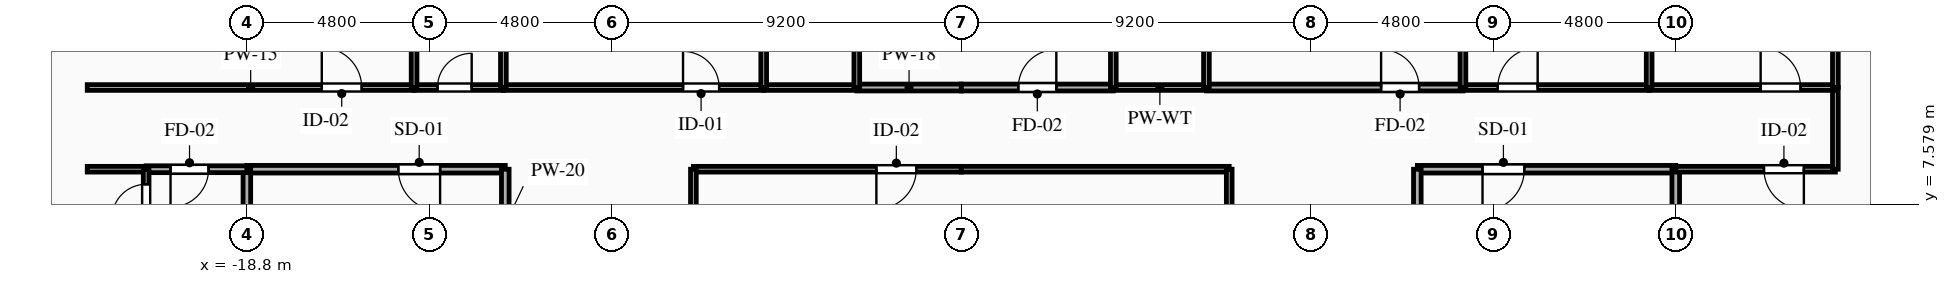
"""IFC4 building model, lengths in metres.
Left out: names, types, materials, properties, quantities, classifications, styles, units other than length and angle.
Written with IfcOpenShell. Run it as: python <this file> out.ifc"""

import sys

from ifc_helpers import new_model, si_unit, direction, frame, frame_2d, origin, place, context, subcontext, project, spatial, rectangle, extrude, element, fill, save


model = new_model("IFC4")
c1 = context("Model", 3, precision=1e-05, world=origin(), true_north=direction((0.0, 1.0)))
c2 = subcontext(c1, "Body", "Model", "MODEL_VIEW")
j1 = project(units=[si_unit("LENGTHUNIT", "METRE"), si_unit("PLANEANGLEUNIT", "RADIAN")], contexts=[c1])
p1 = place(None, origin())
s1 = spatial("IfcSite", under=j1, at=p1, CompositionType="ELEMENT")
p2 = place(p1, origin())
s2 = spatial("IfcBuilding", under=s1, at=p2, CompositionType="ELEMENT")
p3 = place(p2, frame((0.0, 0.0, 37.05)))
s3 = spatial("IfcBuildingStorey", under=s2, at=p3, CompositionType="ELEMENT", Elevation=37.05)
p4 = place(p3, frame((-12.0, 8.5, 0.0), z_axis=(0.0, 0.0, 1.0), x_axis=(-1.0, 0.0, 0.0)))
e1 = element("IfcWall", 1, at=p4, inside=s3, PredefinedType="PARTITIONING", context=c2, shape_type="SweptSolid", body=[
    extrude(rectangle(XDim=6.8, YDim=0.2, at=frame_2d((3.4, 0.0))), origin(), (0.0, 0.0, 1.0), 3.035),
])
p5 = place(p4, frame((1.715, 0.0, 0.0)))
e2 = element("IfcOpeningElement", 2, at=p5, cuts=e1, PredefinedType="OPENING", context=c2, shape_type="SweptSolid", body=[
    extrude(rectangle(XDim=1.1, YDim=2.15, at=frame_2d((0.55, 1.075))), frame((0.0, 0.11, 0.0), z_axis=(0.0, -1.0, 0.0), x_axis=(1.0, 0.0, 0.0)), (0.0, 0.0, 1.0), 0.22),
])
p6 = place(p3, frame((-12.0, 5.6, 0.0), z_axis=(0.0, 0.0, 1.0), x_axis=(0.0, 1.0, 0.0)))
e3 = element("IfcWall", 3, at=p6, inside=s3, PredefinedType="PARTITIONING", context=c2, shape_type="SweptSolid", body=[
    extrude(rectangle(XDim=2.9, YDim=0.2, at=frame_2d((1.45, 0.0))), origin(), (0.0, 0.0, 1.0), 3.035),
])
p7 = place(p3, frame((-18.8, 8.5, 0.0), z_axis=(0.0, 0.0, 1.0), x_axis=(0.0, -1.0, 0.0)))
e4 = element("IfcWall", 4, at=p7, inside=s3, PredefinedType="PARTITIONING", context=c2, shape_type="SweptSolid", body=[
    extrude(rectangle(XDim=2.9, YDim=0.2, at=frame_2d((1.45, 0.0))), origin(), (0.0, 0.0, 1.0), 2.52),
])
p8 = place(p3, frame((18.8, 8.5, 0.0), z_axis=(0.0, 0.0, 1.0), x_axis=(-1.0, 0.0, 0.0)))
e5 = element("IfcWall", 5, at=p8, inside=s3, PredefinedType="PARTITIONING", context=c2, shape_type="SweptSolid", body=[
    extrude(rectangle(XDim=6.8, YDim=0.2, at=frame_2d((3.4, 0.0))), origin(), (0.0, 0.0, 1.0), 3.035),
])
p9 = place(p8, frame((3.985, 0.0, 0.0)))
e6 = element("IfcOpeningElement", 6, at=p9, cuts=e5, PredefinedType="OPENING", context=c2, shape_type="SweptSolid", body=[
    extrude(rectangle(XDim=1.1, YDim=2.15, at=frame_2d((0.55, 1.075))), frame((0.0, 0.11, 0.0), z_axis=(0.0, -1.0, 0.0), x_axis=(1.0, 0.0, 0.0)), (0.0, 0.0, 1.0), 0.22),
])
p10 = place(p3, frame((12.0, 8.5, 0.0), z_axis=(0.0, 0.0, 1.0), x_axis=(0.0, -1.0, 0.0)))
e7 = element("IfcWall", 7, at=p10, inside=s3, PredefinedType="PARTITIONING", context=c2, shape_type="SweptSolid", body=[
    extrude(rectangle(XDim=2.9, YDim=0.2, at=frame_2d((1.45, 0.0))), origin(), (0.0, 0.0, 1.0), 3.035),
])
p11 = place(p3, frame((18.8, 6.327, 0.0), z_axis=(0.0, 0.0, 1.0), x_axis=(0.0, 1.0, 0.0)))
e8 = element("IfcWall", 8, at=p11, inside=s3, PredefinedType="PARTITIONING", context=c2, shape_type="SweptSolid", body=[
    extrude(rectangle(XDim=2.173, YDim=0.2, at=frame_2d((1.086, 0.0))), origin(), (0.0, 0.0, 1.0), 2.52),
])
p12 = place(p3, frame((-18.8, 8.5, 0.0), z_axis=(0.0, 0.0, 1.0), x_axis=(-1.0, 0.0, 0.0)))
e9 = element("IfcWall", 9, at=p12, inside=s3, PredefinedType="PARTITIONING", context=c2, shape_type="SweptSolid", body=[
    extrude(rectangle(XDim=2.65, YDim=0.18, at=frame_2d((1.325, 0.0))), origin(), (0.0, 0.0, 1.0), 3.035),
])
p13 = place(p12, frame((1.009, 0.0, 0.0)))
e10 = element("IfcOpeningElement", 10, at=p13, cuts=e9, PredefinedType="OPENING", context=c2, shape_type="SweptSolid", body=[
    extrude(rectangle(XDim=1.0, YDim=2.15, at=frame_2d((0.5, 1.075))), frame((0.0, 0.1, 0.0), z_axis=(0.0, -1.0, 0.0), x_axis=(1.0, 0.0, 0.0)), (0.0, 0.0, 1.0), 0.2),
])
p14 = place(p3, frame((-21.45, 8.5, 0.0), z_axis=(0.0, 0.0, 1.0), x_axis=(-1.0, 0.0, 0.0)))
e11 = element("IfcWall", 11, at=p14, inside=s3, PredefinedType="PARTITIONING", context=c2, shape_type="SweptSolid", body=[
    extrude(rectangle(XDim=1.55, YDim=0.15, at=frame_2d((0.775, 0.0))), origin(), (0.0, 0.0, 1.0), 3.035),
])
p15 = place(p3, frame((-23.0, 10.65, 0.0), z_axis=(0.0, 0.0, 1.0), x_axis=(1.0, 0.0, 0.0)))
e12 = element("IfcWall", 12, at=p15, inside=s3, PredefinedType="PARTITIONING", context=c2, shape_type="SweptSolid", body=[
    extrude(rectangle(XDim=8.6, YDim=0.15, at=frame_2d((4.3, 0.0))), origin(), (0.0, 0.0, 1.0), 3.035),
])
p16 = place(p15, frame((6.171, 0.0, 0.0)))
e13 = element("IfcOpeningElement", 13, at=p16, cuts=e12, PredefinedType="OPENING", context=c2, shape_type="SweptSolid", body=[
    extrude(rectangle(XDim=1.05, YDim=2.15, at=frame_2d((0.525, 1.075))), frame((0.0, 0.085, 0.0), z_axis=(0.0, -1.0, 0.0), x_axis=(1.0, 0.0, 0.0)), (0.0, 0.0, 1.0), 0.17),
])
p17 = place(p3, frame((-14.4, 10.65, 0.0), z_axis=(0.0, 0.0, 1.0), x_axis=(1.0, 0.0, 0.0)))
e14 = element("IfcWall", 14, at=p17, inside=s3, PredefinedType="PLUMBINGWALL", context=c2, shape_type="SweptSolid", body=[
    extrude(rectangle(XDim=2.35, YDim=0.15, at=frame_2d((1.175, 0.0))), origin(), (0.0, 0.0, 1.0), 3.035),
])
p18 = place(p17, frame((0.616, 0.0, 0.0)))
e15 = element("IfcOpeningElement", 15, at=p18, cuts=e14, PredefinedType="OPENING", context=c2, shape_type="SweptSolid", body=[
    extrude(rectangle(XDim=0.9, YDim=2.1, at=frame_2d((0.45, 1.05))), frame((0.0, 0.085, 0.0), z_axis=(0.0, -1.0, 0.0), x_axis=(1.0, 0.0, 0.0)), (0.0, 0.0, 1.0), 0.17),
])
p19 = place(p3, frame((-12.05, 10.65, 0.0), z_axis=(0.0, 0.0, 1.0), x_axis=(1.0, 0.0, 0.0)))
e16 = element("IfcWall", 16, at=p19, inside=s3, PredefinedType="PARTITIONING", context=c2, shape_type="SweptSolid", body=[
    extrude(rectangle(XDim=6.85, YDim=0.15, at=frame_2d((3.425, 0.0))), origin(), (0.0, 0.0, 1.0), 3.035),
])
p20 = place(p19, frame((4.728, 0.0, 0.0)))
e17 = element("IfcOpeningElement", 17, at=p20, cuts=e16, PredefinedType="OPENING", context=c2, shape_type="SweptSolid", body=[
    extrude(rectangle(XDim=0.95, YDim=2.1, at=frame_2d((0.475, 1.05))), frame((0.0, 0.085, 0.0), z_axis=(0.0, -1.0, 0.0), x_axis=(1.0, 0.0, 0.0)), (0.0, 0.0, 1.0), 0.17),
])
p21 = place(p3, frame((-2.75, 10.65, 0.0), z_axis=(0.0, 0.0, 1.0), x_axis=(1.0, 0.0, 0.0)))
e18 = element("IfcWall", 18, at=p21, inside=s3, PredefinedType="PARTITIONING", context=c2, shape_type="SweptSolid", body=[
    extrude(rectangle(XDim=2.75, YDim=0.18, at=frame_2d((1.375, 0.0))), origin(), (0.0, 0.0, 1.0), 3.035),
])
p22 = place(p3, frame((-5.2, 10.65, 0.0), z_axis=(0.0, 0.0, 1.0), x_axis=(1.0, 0.0, 0.0)))
e19 = element("IfcWall", 19, at=p22, inside=s3, PredefinedType="PLUMBINGWALL", context=c2, shape_type="SweptSolid", body=[
    extrude(rectangle(XDim=2.45, YDim=0.15, at=frame_2d((1.225, 0.0))), origin(), (0.0, 0.0, 1.0), 3.035),
])
p23 = place(p3, frame((0.0, 8.5, 0.0), z_axis=(0.0, 0.0, 1.0), x_axis=(-1.0, 0.0, 0.0)))
e20 = element("IfcWall", 20, at=p23, inside=s3, PredefinedType="PARTITIONING", context=c2, shape_type="SweptSolid", body=[
    extrude(rectangle(XDim=7.05, YDim=0.15, at=frame_2d((3.525, 0.0))), origin(), (0.0, 0.0, 1.0), 3.035),
])
p24 = place(p23, frame((1.185, 0.0, 0.0)))
e21 = element("IfcOpeningElement", 21, at=p24, cuts=e20, PredefinedType="OPENING", context=c2, shape_type="SweptSolid", body=[
    extrude(rectangle(XDim=1.05, YDim=2.15, at=frame_2d((0.525, 1.075))), frame((0.0, 0.085, 0.0), z_axis=(0.0, -1.0, 0.0), x_axis=(1.0, 0.0, 0.0)), (0.0, 0.0, 1.0), 0.17),
])
p25 = place(p3, frame((23.0, 8.5, 0.0), z_axis=(0.0, 0.0, 1.0), x_axis=(-1.0, 0.0, 0.0)))
e22 = element("IfcWall", 22, at=p25, inside=s3, PredefinedType="PARTITIONING", context=c2, shape_type="SweptSolid", body=[
    extrude(rectangle(XDim=4.2, YDim=0.15, at=frame_2d((2.1, 0.0))), origin(), (0.0, 0.0, 1.0), 3.035),
])
p26 = place(p25, frame((0.829, 0.0, 0.0)))
e23 = element("IfcOpeningElement", 23, at=p26, cuts=e22, PredefinedType="OPENING", context=c2, shape_type="SweptSolid", body=[
    extrude(rectangle(XDim=1.05, YDim=2.15, at=frame_2d((0.525, 1.075))), frame((0.0, 0.085, 0.0), z_axis=(0.0, -1.0, 0.0), x_axis=(1.0, 0.0, 0.0)), (0.0, 0.0, 1.0), 0.17),
])
p27 = place(p3, frame((23.0, 10.65, 0.0), z_axis=(0.0, 0.0, 1.0), x_axis=(0.0, -1.0, 0.0)))
e24 = element("IfcWall", 24, at=p27, inside=s3, PredefinedType="PARTITIONING", context=c2, shape_type="SweptSolid", body=[
    extrude(rectangle(XDim=2.15, YDim=0.15, at=frame_2d((1.075, 0.0))), origin(), (0.0, 0.0, 1.0), 3.035),
])
p28 = place(p3, frame((0.0, 10.65, 0.0), z_axis=(0.0, 0.0, 1.0), x_axis=(1.0, 0.0, 0.0)))
e25 = element("IfcWall", 25, at=p28, inside=s3, PredefinedType="PARTITIONING", context=c2, shape_type="SweptSolid", body=[
    extrude(rectangle(XDim=4.0, YDim=0.18, at=frame_2d((2.0, 0.0))), origin(), (0.0, 0.0, 1.0), 3.035),
])
p29 = place(p28, frame((1.5, 0.0, 0.0)))
e26 = element("IfcOpeningElement", 26, at=p29, cuts=e25, PredefinedType="OPENING", context=c2, shape_type="SweptSolid", body=[
    extrude(rectangle(XDim=1.0, YDim=2.15, at=frame_2d((0.5, 1.075))), frame((0.0, 0.1, 0.0), z_axis=(0.0, -1.0, 0.0), x_axis=(1.0, 0.0, 0.0)), (0.0, 0.0, 1.0), 0.2),
])
p30 = place(p3, frame((6.45, 10.65, 0.0), z_axis=(0.0, 0.0, 1.0), x_axis=(1.0, 0.0, 0.0)))
e27 = element("IfcWall", 27, at=p30, inside=s3, PredefinedType="PARTITIONING", context=c2, shape_type="SweptSolid", body=[
    extrude(rectangle(XDim=6.75, YDim=0.18, at=frame_2d((3.375, 0.0))), origin(), (0.0, 0.0, 1.0), 3.035),
])
p31 = place(p30, frame((4.596, 0.0, 0.0)))
e28 = element("IfcOpeningElement", 28, at=p31, cuts=e27, PredefinedType="OPENING", context=c2, shape_type="SweptSolid", body=[
    extrude(rectangle(XDim=1.0, YDim=2.15, at=frame_2d((0.5, 1.075))), frame((0.0, 0.1, 0.0), z_axis=(0.0, -1.0, 0.0), x_axis=(1.0, 0.0, 0.0)), (0.0, 0.0, 1.0), 0.2),
])
p32 = place(p3, frame((4.0, 10.65, 0.0), z_axis=(0.0, 0.0, 1.0), x_axis=(1.0, 0.0, 0.0)))
e29 = element("IfcWall", 29, at=p32, inside=s3, PredefinedType="PLUMBINGWALL", context=c2, shape_type="SweptSolid", body=[
    extrude(rectangle(XDim=2.45, YDim=0.15, at=frame_2d((1.225, 0.0))), origin(), (0.0, 0.0, 1.0), 3.035),
])
p33 = place(p3, frame((13.2, 10.65, 0.0), z_axis=(0.0, 0.0, 1.0), x_axis=(1.0, 0.0, 0.0)))
e30 = element("IfcWall", 30, at=p33, inside=s3, PredefinedType="PARTITIONING", context=c2, shape_type="SweptSolid", body=[
    extrude(rectangle(XDim=4.9, YDim=0.15, at=frame_2d((2.45, 0.0))), origin(), (0.0, 0.0, 1.0), 3.035),
])
p34 = place(p33, frame((0.916, 0.0, 0.0)))
e31 = element("IfcOpeningElement", 31, at=p34, cuts=e30, PredefinedType="OPENING", context=c2, shape_type="SweptSolid", body=[
    extrude(rectangle(XDim=1.05, YDim=2.15, at=frame_2d((0.525, 1.075))), frame((0.0, 0.085, 0.0), z_axis=(0.0, -1.0, 0.0), x_axis=(1.0, 0.0, 0.0)), (0.0, 0.0, 1.0), 0.17),
])
p35 = place(p3, frame((18.1, 10.65, 0.0), z_axis=(0.0, 0.0, 1.0), x_axis=(1.0, 0.0, 0.0)))
e32 = element("IfcWall", 32, at=p35, inside=s3, PredefinedType="PARTITIONING", context=c2, shape_type="SweptSolid", body=[
    extrude(rectangle(XDim=4.9, YDim=0.15, at=frame_2d((2.45, 0.0))), origin(), (0.0, 0.0, 1.0), 3.035),
])
p36 = place(p35, frame((2.934, 0.0, 0.0)))
e33 = element("IfcOpeningElement", 33, at=p36, cuts=e32, PredefinedType="OPENING", context=c2, shape_type="SweptSolid", body=[
    extrude(rectangle(XDim=1.05, YDim=2.15, at=frame_2d((0.525, 1.075))), frame((0.0, 0.085, 0.0), z_axis=(0.0, -1.0, 0.0), x_axis=(1.0, 0.0, 0.0)), (0.0, 0.0, 1.0), 0.17),
])
for number, where, z_axis, x_axis in (
    (34, (7.05, 8.5, 0.0), (0.0, 0.0, 1.0), (-1.0, 0.0, 0.0)),
    (35, (-7.05, 8.5, 0.0), (0.0, 0.0, 1.0), (0.0, -1.0, 0.0)),
    (36, (7.05, 1.45, 0.0), (0.0, 0.0, 1.0), (0.0, 1.0, 0.0)),
):
    element("IfcWall", number, at=place(p3, frame(where, z_axis=z_axis, x_axis=x_axis)), inside=s3, PredefinedType="PARTITIONING", context=c2, shape_type="SweptSolid", body=[
        extrude(rectangle(XDim=7.05, YDim=0.15, at=frame_2d((3.525, 0.0))), origin(), (0.0, 0.0, 1.0), 3.035),
    ])
p37 = place(p3, frame((-21.45, 6.808, 0.0), z_axis=(0.0, 0.0, 1.0), x_axis=(0.0, 1.0, 0.0)))
e37 = element("IfcWall", 37, at=p37, inside=s3, PredefinedType="PARTITIONING", context=c2, shape_type="SweptSolid", body=[
    extrude(rectangle(XDim=1.692, YDim=0.15, at=frame_2d((0.846, 0.0))), origin(), (0.0, 0.0, 1.0), 3.035),
])
p38 = place(p37, frame((0.396, 0.0, 0.0)))
e38 = element("IfcOpeningElement", 38, at=p38, cuts=e37, PredefinedType="OPENING", context=c2, shape_type="SweptSolid", body=[
    extrude(rectangle(XDim=0.9, YDim=2.1, at=frame_2d((0.45, 1.05))), frame((0.0, 0.085, 0.0), z_axis=(0.0, -1.0, 0.0), x_axis=(1.0, 0.0, 0.0)), (0.0, 0.0, 1.0), 0.17),
])
p39 = place(p3, frame((23.0, 10.65, 0.0), z_axis=(0.0, 0.0, 1.0), x_axis=(0.0, 1.0, 0.0)))
e39 = element("IfcWall", 39, at=p39, inside=s3, PredefinedType="PARTITIONING", context=c2, shape_type="SweptSolid", body=[
    extrude(rectangle(XDim=8.75, YDim=0.15, at=frame_2d((4.375, 0.0))), origin(), (0.0, 0.0, 1.0), 3.035),
])
for number, where, z_axis, x_axis in (
    (40, (-14.4, 19.4, 0.0), (0.0, 0.0, 1.0), (0.0, -1.0, 0.0)),
    (41, (-12.05, 19.4, 0.0), (0.0, 0.0, 1.0), (0.0, -1.0, 0.0)),
):
    element("IfcWall", number, at=place(p3, frame(where, z_axis=z_axis, x_axis=x_axis)), inside=s3, PredefinedType="PLUMBINGWALL", context=c2, shape_type="SweptSolid", body=[
        extrude(rectangle(XDim=8.75, YDim=0.15, at=frame_2d((4.375, 0.0))), origin(), (0.0, 0.0, 1.0), 3.035),
    ])
for number, where, z_axis, x_axis in (
    (42, (-5.2, 12.8, 0.0), (0.0, 0.0, 1.0), (0.0, -1.0, 0.0)),
    (43, (-2.75, 10.65, 0.0), (0.0, 0.0, 1.0), (0.0, 1.0, 0.0)),
    (44, (4.0, 12.8, 0.0), (0.0, 0.0, 1.0), (0.0, -1.0, 0.0)),
    (45, (6.45, 10.65, 0.0), (0.0, 0.0, 1.0), (0.0, 1.0, 0.0)),
):
    element("IfcWall", number, at=place(p3, frame(where, z_axis=z_axis, x_axis=x_axis)), inside=s3, PredefinedType="PLUMBINGWALL", context=c2, shape_type="SweptSolid", body=[
        extrude(rectangle(XDim=2.15, YDim=0.15, at=frame_2d((1.075, 0.0))), origin(), (0.0, 0.0, 1.0), 3.035),
    ])
for number, where, z_axis, x_axis in (
    (46, (13.2, 19.4, 0.0), (0.0, 0.0, 1.0), (0.0, -1.0, 0.0)),
    (47, (18.1, 19.4, 0.0), (0.0, 0.0, 1.0), (0.0, -1.0, 0.0)),
):
    element("IfcWall", number, at=place(p3, frame(where, z_axis=z_axis, x_axis=x_axis)), inside=s3, PredefinedType="PARTITIONING", context=c2, shape_type="SweptSolid", body=[
        extrude(rectangle(XDim=8.75, YDim=0.15, at=frame_2d((4.375, 0.0))), origin(), (0.0, 0.0, 1.0), 3.035),
    ])
p40 = place(p5, origin())
e48 = element("IfcDoor", 48, at=p40, inside=s3, OperationType="SINGLE_SWING_LEFT", PredefinedType="DOOR", context=c2, shape_type="SweptSolid", body=[
    extrude(rectangle(XDim=1.1, YDim=2.15, at=frame_2d((0.55, 1.075))), frame((0.0, 0.025, 0.0), z_axis=(0.0, -1.0, 0.0), x_axis=(1.0, 0.0, 0.0)), (0.0, 0.0, 1.0), 0.05),
])
fill(e2, e48)
p41 = place(p9, origin())
e49 = element("IfcDoor", 49, at=p41, inside=s3, OperationType="SINGLE_SWING_RIGHT", PredefinedType="DOOR", context=c2, shape_type="SweptSolid", body=[
    extrude(rectangle(XDim=1.1, YDim=2.15, at=frame_2d((0.55, 1.075))), frame((0.0, 0.025, 0.0), z_axis=(0.0, -1.0, 0.0), x_axis=(1.0, 0.0, 0.0)), (0.0, 0.0, 1.0), 0.05),
])
fill(e6, e49)
p42 = place(p13, origin())
e50 = element("IfcDoor", 50, at=p42, inside=s3, OperationType="SINGLE_SWING_RIGHT", PredefinedType="DOOR", context=c2, shape_type="SweptSolid", body=[
    extrude(rectangle(XDim=1.0, YDim=2.15, at=frame_2d((0.5, 1.075))), frame((0.0, 0.025, 0.0), z_axis=(0.0, -1.0, 0.0), x_axis=(1.0, 0.0, 0.0)), (0.0, 0.0, 1.0), 0.05),
])
fill(e10, e50)
p43 = place(p16, origin())
e51 = element("IfcDoor", 51, at=p43, inside=s3, OperationType="SINGLE_SWING_LEFT", PredefinedType="DOOR", context=c2, shape_type="SweptSolid", body=[
    extrude(rectangle(XDim=1.05, YDim=2.15, at=frame_2d((0.525, 1.075))), frame((0.0, 0.025, 0.0), z_axis=(0.0, -1.0, 0.0), x_axis=(1.0, 0.0, 0.0)), (0.0, 0.0, 1.0), 0.05),
])
fill(e13, e51)
p44 = place(p18, origin())
e52 = element("IfcDoor", 52, at=p44, inside=s3, OperationType="SINGLE_SWING_RIGHT", PredefinedType="DOOR", context=c2, shape_type="SweptSolid", body=[
    extrude(rectangle(XDim=0.9, YDim=2.1, at=frame_2d((0.45, 1.05))), frame((0.0, 0.025, 0.0), z_axis=(0.0, -1.0, 0.0), x_axis=(1.0, 0.0, 0.0)), (0.0, 0.0, 1.0), 0.05),
])
fill(e15, e52)
p45 = place(p20, origin())
e53 = element("IfcDoor", 53, at=p45, inside=s3, OperationType="SINGLE_SWING_LEFT", PredefinedType="DOOR", context=c2, shape_type="SweptSolid", body=[
    extrude(rectangle(XDim=0.95, YDim=2.1, at=frame_2d((0.475, 1.05))), frame((0.0, 0.025, 0.0), z_axis=(0.0, -1.0, 0.0), x_axis=(1.0, 0.0, 0.0)), (0.0, 0.0, 1.0), 0.05),
])
fill(e17, e53)
p46 = place(p24, origin())
e54 = element("IfcDoor", 54, at=p46, inside=s3, OperationType="SINGLE_SWING_RIGHT", PredefinedType="DOOR", context=c2, shape_type="SweptSolid", body=[
    extrude(rectangle(XDim=1.05, YDim=2.15, at=frame_2d((0.525, 1.075))), frame((0.0, 0.025, 0.0), z_axis=(0.0, -1.0, 0.0), x_axis=(1.0, 0.0, 0.0)), (0.0, 0.0, 1.0), 0.05),
])
fill(e21, e54)
p47 = place(p26, origin())
e55 = element("IfcDoor", 55, at=p47, inside=s3, OperationType="SINGLE_SWING_LEFT", PredefinedType="DOOR", context=c2, shape_type="SweptSolid", body=[
    extrude(rectangle(XDim=1.05, YDim=2.15, at=frame_2d((0.525, 1.075))), frame((0.0, 0.025, 0.0), z_axis=(0.0, -1.0, 0.0), x_axis=(1.0, 0.0, 0.0)), (0.0, 0.0, 1.0), 0.05),
])
fill(e23, e55)
p48 = place(p29, origin())
e56 = element("IfcDoor", 56, at=p48, inside=s3, OperationType="SINGLE_SWING_RIGHT", PredefinedType="DOOR", context=c2, shape_type="SweptSolid", body=[
    extrude(rectangle(XDim=1.0, YDim=2.15, at=frame_2d((0.5, 1.075))), frame((0.0, 0.025, 0.0), z_axis=(0.0, -1.0, 0.0), x_axis=(1.0, 0.0, 0.0)), (0.0, 0.0, 1.0), 0.05),
])
fill(e26, e56)
p49 = place(p31, origin())
e57 = element("IfcDoor", 57, at=p49, inside=s3, OperationType="SINGLE_SWING_LEFT", PredefinedType="DOOR", context=c2, shape_type="SweptSolid", body=[
    extrude(rectangle(XDim=1.0, YDim=2.15, at=frame_2d((0.5, 1.075))), frame((0.0, 0.025, 0.0), z_axis=(0.0, -1.0, 0.0), x_axis=(1.0, 0.0, 0.0)), (0.0, 0.0, 1.0), 0.05),
])
fill(e28, e57)
p50 = place(p34, origin())
e58 = element("IfcDoor", 58, at=p50, inside=s3, OperationType="SINGLE_SWING_RIGHT", PredefinedType="DOOR", context=c2, shape_type="SweptSolid", body=[
    extrude(rectangle(XDim=1.05, YDim=2.15, at=frame_2d((0.525, 1.075))), frame((0.0, 0.025, 0.0), z_axis=(0.0, -1.0, 0.0), x_axis=(1.0, 0.0, 0.0)), (0.0, 0.0, 1.0), 0.05),
])
fill(e31, e58)
p51 = place(p36, origin())
e59 = element("IfcDoor", 59, at=p51, inside=s3, OperationType="SINGLE_SWING_LEFT", PredefinedType="DOOR", context=c2, shape_type="SweptSolid", body=[
    extrude(rectangle(XDim=1.05, YDim=2.15, at=frame_2d((0.525, 1.075))), frame((0.0, 0.025, 0.0), z_axis=(0.0, -1.0, 0.0), x_axis=(1.0, 0.0, 0.0)), (0.0, 0.0, 1.0), 0.05),
])
fill(e33, e59)
p52 = place(p38, origin())
e60 = element("IfcDoor", 60, at=p52, inside=s3, OperationType="SINGLE_SWING_LEFT", PredefinedType="DOOR", context=c2, shape_type="SweptSolid", body=[
    extrude(rectangle(XDim=0.9, YDim=2.1, at=frame_2d((0.45, 1.05))), frame((0.0, 0.025, 0.0), z_axis=(0.0, -1.0, 0.0), x_axis=(1.0, 0.0, 0.0)), (0.0, 0.0, 1.0), 0.05),
])
fill(e38, e60)
save(model, sys.argv[1])
